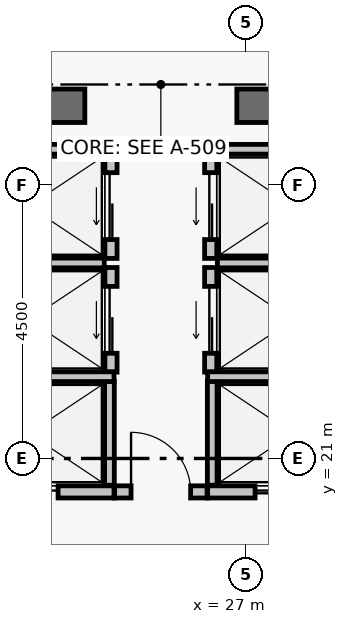
"""IFC4 building model, lengths in metres.
Left out: names, types, materials, properties, quantities, classifications, styles, units other than length and angle.
Written with IfcOpenShell. Run it as: python <this file> out.ifc"""

import sys

from ifc_helpers import new_model, si_unit, direction, frame, frame_2d, origin, place, context, subcontext, project, spatial, rectangle, extrude, element, fill, save


model = new_model("IFC4")
c1 = context("Model", 3, precision=1e-05, world=origin(), true_north=direction((0.0, 1.0)))
c2 = subcontext(c1, "Body", "Model", "MODEL_VIEW")
j1 = project(units=[si_unit("LENGTHUNIT", "METRE"), si_unit("PLANEANGLEUNIT", "RADIAN")], contexts=[c1])
p1 = place(None, origin())
s1 = spatial("IfcSite", under=j1, at=p1, CompositionType="ELEMENT")
p2 = place(p1, origin())
s2 = spatial("IfcBuilding", under=s1, at=p2, CompositionType="ELEMENT")
p3 = place(p2, frame((0.0, 0.0, 92.82)))
s3 = spatial("IfcBuildingStorey", under=s2, at=p3, CompositionType="ELEMENT", Elevation=92.82)
p4 = place(p3, frame((22.645, 26.8, 0.0), z_axis=(0.0, 0.0, 1.0), x_axis=(1.0, 0.0, 0.0)))
e1 = element("IfcWall", 1, at=p4, inside=s3, PredefinedType="SHEAR", context=c2, shape_type="SweptSolid", body=[
    extrude(rectangle(XDim=1.705, YDim=0.55, at=frame_2d((0.853, 0.0))), origin(), (0.0, 0.0, 1.0), 3.47),
])
p5 = place(p3, frame((26.85, 26.8, 0.0), z_axis=(0.0, 0.0, 1.0), x_axis=(1.0, 0.0, 0.0)))
e2 = element("IfcWall", 2, at=p5, inside=s3, PredefinedType="SHEAR", context=c2, shape_type="SweptSolid", body=[
    extrude(rectangle(XDim=1.705, YDim=0.55, at=frame_2d((0.853, 0.0))), origin(), (0.0, 0.0, 1.0), 3.47),
])
p6 = place(p3, frame((24.84, 20.45, 0.0), z_axis=(0.0, 0.0, 1.0), x_axis=(1.0, 0.0, 0.0)))
e3 = element("IfcWall", 3, at=p6, inside=s3, PredefinedType="PARTITIONING", context=c2, shape_type="SweptSolid", body=[
    extrude(rectangle(XDim=1.52, YDim=0.2, at=frame_2d((0.76, 0.0))), origin(), (0.0, 0.0, 1.0), 3.47),
])
p7 = place(p6, frame((0.27, 0.0, 0.0)))
e4 = element("IfcOpeningElement", 4, at=p7, cuts=e3, PredefinedType="OPENING", context=c2, shape_type="SweptSolid", body=[
    extrude(rectangle(XDim=0.98, YDim=2.06, at=frame_2d((0.49, 1.03))), frame((0.0, 0.11, 0.0), z_axis=(0.0, -1.0, 0.0), x_axis=(1.0, 0.0, 0.0)), (0.0, 0.0, 1.0), 0.22),
])
p8 = place(p3, frame((22.03, 20.45, 0.0), z_axis=(0.0, 0.0, 1.0), x_axis=(1.0, 0.0, 0.0)))
e5 = element("IfcWall", 5, at=p8, inside=s3, PredefinedType="PARTITIONING", context=c2, shape_type="SweptSolid", body=[
    extrude(rectangle(XDim=2.8, YDim=0.2, at=frame_2d((1.4, 0.0))), origin(), (0.0, 0.0, 1.0), 3.47),
])
p9 = place(p8, frame((0.78, 0.0, 0.0)))
e6 = element("IfcOpeningElement", 6, at=p9, cuts=e5, PredefinedType="OPENING", context=c2, shape_type="SweptSolid", body=[
    extrude(rectangle(XDim=1.1, YDim=2.08, at=frame_2d((0.55, 1.04))), frame((0.0, 0.11, 0.0), z_axis=(0.0, -1.0, 0.0), x_axis=(1.0, 0.0, 0.0)), (0.0, 0.0, 1.0), 0.22),
])
p10 = place(p3, frame((26.37, 20.45, 0.0), z_axis=(0.0, 0.0, 1.0), x_axis=(1.0, 0.0, 0.0)))
e7 = element("IfcWall", 7, at=p10, inside=s3, PredefinedType="PARTITIONING", context=c2, shape_type="SweptSolid", body=[
    extrude(rectangle(XDim=2.8, YDim=0.2, at=frame_2d((1.4, 0.0))), origin(), (0.0, 0.0, 1.0), 3.47),
])
p11 = place(p10, frame((0.78, 0.0, 0.0)))
e8 = element("IfcOpeningElement", 8, at=p11, cuts=e7, PredefinedType="OPENING", context=c2, shape_type="SweptSolid", body=[
    extrude(rectangle(XDim=1.1, YDim=2.08, at=frame_2d((0.55, 1.04))), frame((0.0, 0.11, 0.0), z_axis=(0.0, -1.0, 0.0), x_axis=(1.0, 0.0, 0.0)), (0.0, 0.0, 1.0), 0.22),
])
p12 = place(p3, frame((24.78, 22.42, 0.0), z_axis=(0.0, 0.0, 1.0), x_axis=(0.0, 1.0, 0.0)))
e9 = element("IfcWall", 9, at=p12, inside=s3, PredefinedType="PARTITIONING", context=c2, shape_type="SweptSolid", body=[
    extrude(rectangle(XDim=1.72, YDim=0.2, at=frame_2d((0.86, 0.0))), origin(), (0.0, 0.0, 1.0), 3.47),
])
p13 = place(p12, frame((0.31, 0.0, 0.0)))
e10 = element("IfcOpeningElement", 10, at=p13, cuts=e9, PredefinedType="OPENING", context=c2, shape_type="SweptSolid", body=[
    extrude(rectangle(XDim=1.1, YDim=2.08, at=frame_2d((0.55, 1.04))), frame((0.0, 0.11, 0.0), z_axis=(0.0, -1.0, 0.0), x_axis=(1.0, 0.0, 0.0)), (0.0, 0.0, 1.0), 0.22),
])
p14 = place(p3, frame((24.78, 24.29, 0.0), z_axis=(0.0, 0.0, 1.0), x_axis=(0.0, 1.0, 0.0)))
e11 = element("IfcWall", 11, at=p14, inside=s3, PredefinedType="PARTITIONING", context=c2, shape_type="SweptSolid", body=[
    extrude(rectangle(XDim=1.72, YDim=0.2, at=frame_2d((0.86, 0.0))), origin(), (0.0, 0.0, 1.0), 3.47),
])
p15 = place(p14, frame((0.31, 0.0, 0.0)))
e12 = element("IfcOpeningElement", 12, at=p15, cuts=e11, PredefinedType="OPENING", context=c2, shape_type="SweptSolid", body=[
    extrude(rectangle(XDim=1.1, YDim=2.08, at=frame_2d((0.55, 1.04))), frame((0.0, 0.11, 0.0), z_axis=(0.0, -1.0, 0.0), x_axis=(1.0, 0.0, 0.0)), (0.0, 0.0, 1.0), 0.22),
])
p16 = place(p3, frame((26.42, 22.42, 0.0), z_axis=(0.0, 0.0, 1.0), x_axis=(0.0, 1.0, 0.0)))
e13 = element("IfcWall", 13, at=p16, inside=s3, PredefinedType="PARTITIONING", context=c2, shape_type="SweptSolid", body=[
    extrude(rectangle(XDim=1.72, YDim=0.2, at=frame_2d((0.86, 0.0))), origin(), (0.0, 0.0, 1.0), 3.47),
])
p17 = place(p16, frame((0.31, 0.0, 0.0)))
e14 = element("IfcOpeningElement", 14, at=p17, cuts=e13, PredefinedType="OPENING", context=c2, shape_type="SweptSolid", body=[
    extrude(rectangle(XDim=1.1, YDim=2.08, at=frame_2d((0.55, 1.04))), frame((0.0, 0.11, 0.0), z_axis=(0.0, -1.0, 0.0), x_axis=(1.0, 0.0, 0.0)), (0.0, 0.0, 1.0), 0.22),
])
p18 = place(p3, frame((26.42, 24.29, 0.0), z_axis=(0.0, 0.0, 1.0), x_axis=(0.0, 1.0, 0.0)))
e15 = element("IfcWall", 15, at=p18, inside=s3, PredefinedType="PARTITIONING", context=c2, shape_type="SweptSolid", body=[
    extrude(rectangle(XDim=1.72, YDim=0.2, at=frame_2d((0.86, 0.0))), origin(), (0.0, 0.0, 1.0), 3.47),
])
p19 = place(p18, frame((0.31, 0.0, 0.0)))
e16 = element("IfcOpeningElement", 16, at=p19, cuts=e15, PredefinedType="OPENING", context=c2, shape_type="SweptSolid", body=[
    extrude(rectangle(XDim=1.1, YDim=2.08, at=frame_2d((0.55, 1.04))), frame((0.0, 0.11, 0.0), z_axis=(0.0, -1.0, 0.0), x_axis=(1.0, 0.0, 0.0)), (0.0, 0.0, 1.0), 0.22),
])
p20 = place(p3, frame((24.755, 20.56, 0.0), z_axis=(0.0, 0.0, 1.0), x_axis=(0.0, 1.0, 0.0)))
e17 = element("IfcWall", 17, at=p20, inside=s3, PredefinedType="PARTITIONING", context=c2, shape_type="SweptSolid", body=[
    extrude(rectangle(XDim=1.71, YDim=0.16, at=frame_2d((0.855, 0.0))), origin(), (0.0, 0.0, 1.0), 3.47),
])
p21 = place(p3, frame((22.18, 22.345, 0.0), z_axis=(0.0, 0.0, 1.0), x_axis=(1.0, 0.0, 0.0)))
e18 = element("IfcWall", 18, at=p21, inside=s3, PredefinedType="PARTITIONING", context=c2, shape_type="SweptSolid", body=[
    extrude(rectangle(XDim=2.65, YDim=0.16, at=frame_2d((1.325, 0.0))), origin(), (0.0, 0.0, 1.0), 3.47),
])
p22 = place(p3, frame((22.18, 24.215, 0.0), z_axis=(0.0, 0.0, 1.0), x_axis=(1.0, 0.0, 0.0)))
e19 = element("IfcWall", 19, at=p22, inside=s3, PredefinedType="PARTITIONING", context=c2, shape_type="SweptSolid", body=[
    extrude(rectangle(XDim=2.49, YDim=0.16, at=frame_2d((1.245, 0.0))), origin(), (0.0, 0.0, 1.0), 3.47),
])
p23 = place(p3, frame((22.03, 26.085, 0.0), z_axis=(0.0, 0.0, 1.0), x_axis=(1.0, 0.0, 0.0)))
e20 = element("IfcWall", 20, at=p23, inside=s3, PredefinedType="PARTITIONING", context=c2, shape_type="SweptSolid", body=[
    extrude(rectangle(XDim=2.83, YDim=0.16, at=frame_2d((1.415, 0.0))), origin(), (0.0, 0.0, 1.0), 3.47),
])
p24 = place(p3, frame((26.445, 20.56, 0.0), z_axis=(0.0, 0.0, 1.0), x_axis=(0.0, 1.0, 0.0)))
e21 = element("IfcWall", 21, at=p24, inside=s3, PredefinedType="PARTITIONING", context=c2, shape_type="SweptSolid", body=[
    extrude(rectangle(XDim=1.71, YDim=0.16, at=frame_2d((0.855, 0.0))), origin(), (0.0, 0.0, 1.0), 3.47),
])
p25 = place(p3, frame((26.37, 22.345, 0.0), z_axis=(0.0, 0.0, 1.0), x_axis=(1.0, 0.0, 0.0)))
e22 = element("IfcWall", 22, at=p25, inside=s3, PredefinedType="PARTITIONING", context=c2, shape_type="SweptSolid", body=[
    extrude(rectangle(XDim=2.65, YDim=0.16, at=frame_2d((1.325, 0.0))), origin(), (0.0, 0.0, 1.0), 3.47),
])
p26 = place(p3, frame((26.53, 24.215, 0.0), z_axis=(0.0, 0.0, 1.0), x_axis=(1.0, 0.0, 0.0)))
e23 = element("IfcWall", 23, at=p26, inside=s3, PredefinedType="PARTITIONING", context=c2, shape_type="SweptSolid", body=[
    extrude(rectangle(XDim=2.49, YDim=0.16, at=frame_2d((1.245, 0.0))), origin(), (0.0, 0.0, 1.0), 3.47),
])
p27 = place(p3, frame((26.34, 26.085, 0.0), z_axis=(0.0, 0.0, 1.0), x_axis=(1.0, 0.0, 0.0)))
e24 = element("IfcWall", 24, at=p27, inside=s3, PredefinedType="PARTITIONING", context=c2, shape_type="SweptSolid", body=[
    extrude(rectangle(XDim=2.83, YDim=0.16, at=frame_2d((1.415, 0.0))), origin(), (0.0, 0.0, 1.0), 3.47),
])
p28 = place(p7, origin())
e25 = element("IfcDoor", 25, at=p28, inside=s3, OperationType="SINGLE_SWING_LEFT", PredefinedType="DOOR", context=c2, shape_type="SweptSolid", body=[
    extrude(rectangle(XDim=0.98, YDim=2.06, at=frame_2d((0.49, 1.03))), frame((0.0, 0.025, 0.0), z_axis=(0.0, -1.0, 0.0), x_axis=(1.0, 0.0, 0.0)), (0.0, 0.0, 1.0), 0.05),
])
fill(e4, e25)
p29 = place(p9, origin())
e26 = element("IfcDoor", 26, at=p29, inside=s3, OperationType="DOUBLE_DOOR_SLIDING", PredefinedType="DOOR", context=c2, shape_type="SweptSolid", body=[
    extrude(rectangle(XDim=1.1, YDim=2.08, at=frame_2d((0.55, 1.04))), frame((0.0, 0.025, 0.0), z_axis=(0.0, -1.0, 0.0), x_axis=(1.0, 0.0, 0.0)), (0.0, 0.0, 1.0), 0.05),
])
fill(e6, e26)
p30 = place(p11, origin())
e27 = element("IfcDoor", 27, at=p30, inside=s3, OperationType="DOUBLE_DOOR_SLIDING", PredefinedType="DOOR", context=c2, shape_type="SweptSolid", body=[
    extrude(rectangle(XDim=1.1, YDim=2.08, at=frame_2d((0.55, 1.04))), frame((0.0, 0.025, 0.0), z_axis=(0.0, -1.0, 0.0), x_axis=(1.0, 0.0, 0.0)), (0.0, 0.0, 1.0), 0.05),
])
fill(e8, e27)
p31 = place(p13, origin())
e28 = element("IfcDoor", 28, at=p31, inside=s3, OperationType="DOUBLE_DOOR_SLIDING", PredefinedType="DOOR", context=c2, shape_type="SweptSolid", body=[
    extrude(rectangle(XDim=1.1, YDim=2.08, at=frame_2d((0.55, 1.04))), frame((0.0, 0.025, 0.0), z_axis=(0.0, -1.0, 0.0), x_axis=(1.0, 0.0, 0.0)), (0.0, 0.0, 1.0), 0.05),
])
fill(e10, e28)
p32 = place(p15, origin())
e29 = element("IfcDoor", 29, at=p32, inside=s3, OperationType="DOUBLE_DOOR_SLIDING", PredefinedType="DOOR", context=c2, shape_type="SweptSolid", body=[
    extrude(rectangle(XDim=1.1, YDim=2.08, at=frame_2d((0.55, 1.04))), frame((0.0, 0.025, 0.0), z_axis=(0.0, -1.0, 0.0), x_axis=(1.0, 0.0, 0.0)), (0.0, 0.0, 1.0), 0.05),
])
fill(e12, e29)
p33 = place(p17, origin())
e30 = element("IfcDoor", 30, at=p33, inside=s3, OperationType="DOUBLE_DOOR_SLIDING", PredefinedType="DOOR", context=c2, shape_type="SweptSolid", body=[
    extrude(rectangle(XDim=1.1, YDim=2.08, at=frame_2d((0.55, 1.04))), frame((0.0, 0.025, 0.0), z_axis=(0.0, -1.0, 0.0), x_axis=(1.0, 0.0, 0.0)), (0.0, 0.0, 1.0), 0.05),
])
fill(e14, e30)
p34 = place(p19, origin())
e31 = element("IfcDoor", 31, at=p34, inside=s3, OperationType="DOUBLE_DOOR_SLIDING", PredefinedType="DOOR", context=c2, shape_type="SweptSolid", body=[
    extrude(rectangle(XDim=1.1, YDim=2.08, at=frame_2d((0.55, 1.04))), frame((0.0, 0.025, 0.0), z_axis=(0.0, -1.0, 0.0), x_axis=(1.0, 0.0, 0.0)), (0.0, 0.0, 1.0), 0.05),
])
fill(e16, e31)
save(model, sys.argv[1])
